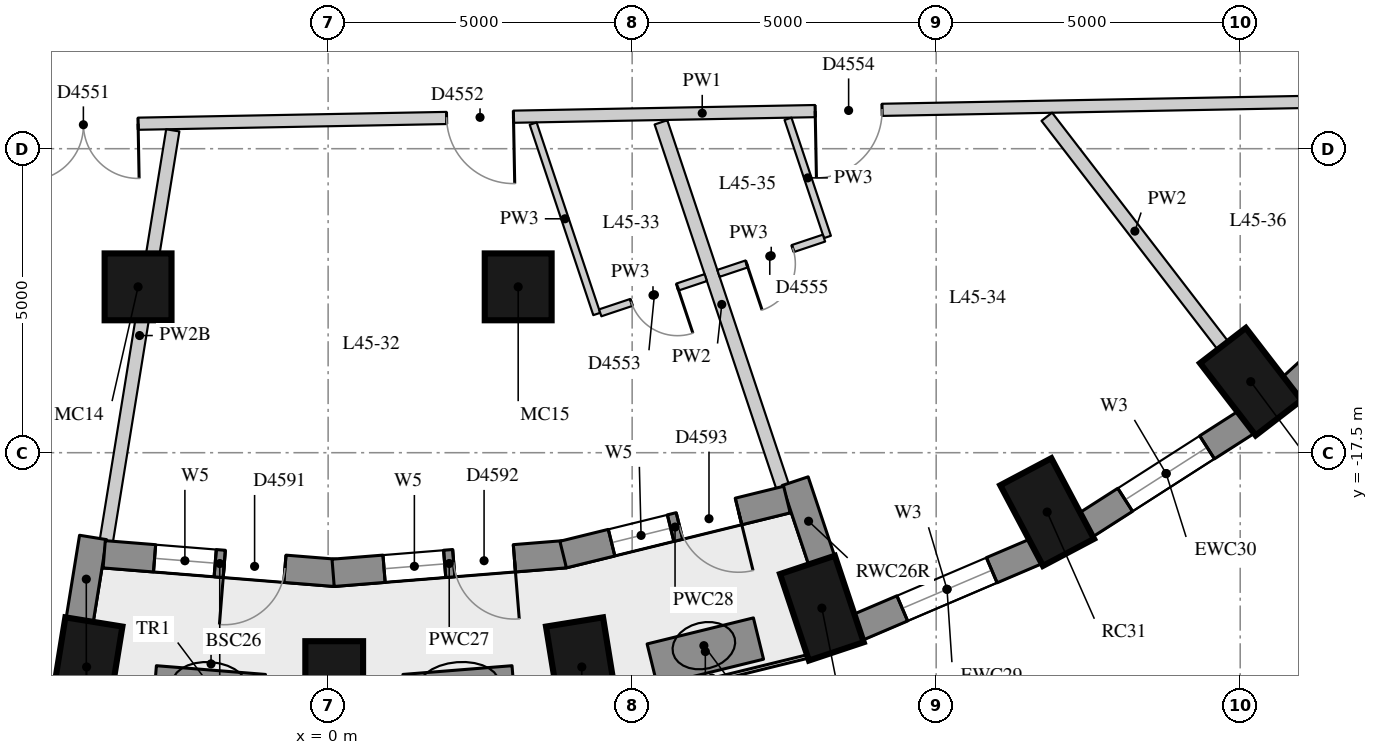
"""IFC4 building model, lengths in metres.
Left out: names, types, materials, properties, quantities, classifications, styles, units other than length and angle.
Written with IfcOpenShell. Run it as: python <this file> out.ifc"""

import sys

from ifc_helpers import new_model, si_unit, direction, frame, frame_2d, origin, origin_2d, place, context, subcontext, project, spatial, rectangle, extrude, element, fill, save


model = new_model("IFC4")
c1 = context("Model", 3, precision=1e-05, world=origin(), true_north=direction((0.0, 1.0)))
c2 = subcontext(c1, "Body", "Model", "MODEL_VIEW")
j1 = project(units=[si_unit("LENGTHUNIT", "METRE"), si_unit("PLANEANGLEUNIT", "RADIAN")], contexts=[c1])
p1 = place(None, origin())
s1 = spatial("IfcSite", under=j1, at=p1, CompositionType="ELEMENT")
p2 = place(p1, origin())
s2 = spatial("IfcBuilding", under=s1, at=p2, CompositionType="ELEMENT")
p3 = place(p2, frame((0.0, 0.0, 161.6)))
s3 = spatial("IfcBuildingStorey", under=s2, at=p3, CompositionType="ELEMENT", Elevation=161.6)
for number, where, z_axis, x_axis in (
    (1, (-3.972, -21.024, 0.0), (0.0, 0.0, 1.0), (-0.16, -0.987, 0.0)),
    (2, (0.1, -21.35, 0.0), (0.0, 0.0, 1.0), (0.0, -1.0, 0.0)),
    (3, (4.172, -21.024, 0.0), (0.0, 0.0, 1.0), (0.16, -0.987, 0.0)),
    (4, (8.12, -20.056, 0.0), (0.0, 0.0, 1.0), (0.317, -0.949, 0.0)),
    (5, (11.825, -18.476, 0.0), (0.0, 0.0, 1.0), (0.468, -0.884, 0.0)),
    (6, (15.173, -16.332, 0.0), (0.0, 0.0, 1.0), (0.61, -0.792, 0.0)),
):
    element("IfcColumn", number, at=place(p3, frame(where, z_axis=z_axis, x_axis=x_axis)), inside=s3, PredefinedType="COLUMN", context=c2, shape_type="SweptSolid", body=[
        extrude(rectangle(XDim=1.5, YDim=0.95, at=origin_2d()), origin(), (0.0, 0.0, 1.0), 3.3),
    ])
for number, where, z_axis, x_axis in (
    (7, (-3.126, -14.772, 0.0), (0.0, 0.0, 1.0), (1.0, 0.0, 0.0)),
    (8, (3.126, -14.772, 0.0), (0.0, 0.0, 1.0), (1.0, 0.0, 0.0)),
):
    element("IfcColumn", number, at=place(p3, frame(where, z_axis=z_axis, x_axis=x_axis)), inside=s3, PredefinedType="COLUMN", context=c2, shape_type="SweptSolid", body=[
        extrude(rectangle(XDim=1.1, YDim=1.1, at=origin_2d()), origin(), (0.0, 0.0, 1.0), 3.3),
    ])
p4 = place(p3, frame((-7.643, -20.662, 0.0), z_axis=(0.0, 0.0, 1.0), x_axis=(0.971232901476, -0.238131583563, 0.0)))
e9 = element("IfcWall", 9, at=p4, inside=s3, PredefinedType="SOLIDWALL", context=c2, shape_type="SweptSolid", body=[
    extrude(rectangle(XDim=3.237, YDim=0.45, at=frame_2d((1.618, 0.0))), origin(), (0.0, 0.0, 1.0), 3.02),
])
p5 = place(p4, frame((0.818, 0.0, 0.4)))
e10 = element("IfcOpeningElement", 10, at=p5, cuts=e9, PredefinedType="OPENING", context=c2, shape_type="SweptSolid", body=[
    extrude(rectangle(XDim=1.6, YDim=1.75, at=frame_2d((0.8, 0.875))), frame((0.0, 0.235, 0.0), z_axis=(0.0, -1.0, 0.0), x_axis=(1.0, 0.0, 0.0)), (0.0, 0.0, 1.0), 0.47),
])
p6 = place(p3, frame((8.706, -20.375, 0.0), z_axis=(0.0, 0.0, 1.0), x_axis=(0.91981046949, 0.392362969986, 0.0)))
e11 = element("IfcWall", 11, at=p6, inside=s3, PredefinedType="SOLIDWALL", context=c2, shape_type="SweptSolid", body=[
    extrude(rectangle(XDim=3.201, YDim=0.45, at=frame_2d((1.6, 0.0))), origin(), (0.0, 0.0, 1.0), 3.02),
])
p7 = place(p6, frame((0.8, 0.0, 0.4)))
e12 = element("IfcOpeningElement", 12, at=p7, cuts=e11, PredefinedType="OPENING", context=c2, shape_type="SweptSolid", body=[
    extrude(rectangle(XDim=1.6, YDim=1.75, at=frame_2d((0.8, 0.875))), frame((0.0, 0.235, 0.0), z_axis=(0.0, -1.0, 0.0), x_axis=(1.0, 0.0, 0.0)), (0.0, 0.0, 1.0), 0.47),
])
p8 = place(p3, frame((12.455, -18.693, 0.0), z_axis=(0.0, 0.0, 1.0), x_axis=(0.842065914439, 0.539374633943, 0.0)))
e13 = element("IfcWall", 13, at=p8, inside=s3, PredefinedType="SOLIDWALL", context=c2, shape_type="SweptSolid", body=[
    extrude(rectangle(XDim=3.151, YDim=0.45, at=frame_2d((1.576, 0.0))), origin(), (0.0, 0.0, 1.0), 3.02),
])
p9 = place(p8, frame((0.776, 0.0, 0.4)))
e14 = element("IfcOpeningElement", 14, at=p9, cuts=e13, PredefinedType="OPENING", context=c2, shape_type="SweptSolid", body=[
    extrude(rectangle(XDim=1.6, YDim=1.75, at=frame_2d((0.8, 0.875))), frame((0.0, 0.235, 0.0), z_axis=(0.0, -1.0, 0.0), x_axis=(1.0, 0.0, 0.0)), (0.0, 0.0, 1.0), 0.47),
])
p10 = place(p3, frame((15.83, -16.439, 0.0), z_axis=(0.0, 0.0, 1.0), x_axis=(0.737808755941, 0.675009807082, 0.0)))
e15 = element("IfcWall", 15, at=p10, inside=s3, PredefinedType="SOLIDWALL", context=c2, shape_type="SweptSolid", body=[
    extrude(rectangle(XDim=3.094, YDim=0.45, at=frame_2d((1.547, 0.0))), origin(), (0.0, 0.0, 1.0), 3.02),
])
p11 = place(p3, frame((-4.088, -20.266, 0.0), z_axis=(0.0, 0.0, 1.0), x_axis=(0.159641024018, 0.98717513312, 0.0)))
e16 = element("IfcWall", 16, at=p11, inside=s3, PredefinedType="SOLIDWALL", context=c2, shape_type="SweptSolid", body=[
    extrude(rectangle(XDim=1.39, YDim=0.45, at=frame_2d((0.695, 0.0))), origin(), (0.0, 0.0, 1.0), 2.57),
])
p12 = place(p3, frame((8.122, -19.286, 0.0), z_axis=(0.0, 0.0, 1.0), x_axis=(-0.316649231286, 0.948542705589, 0.0)))
e17 = element("IfcWall", 17, at=p12, inside=s3, PredefinedType="SOLIDWALL", context=c2, shape_type="SweptSolid", body=[
    extrude(rectangle(XDim=1.39, YDim=0.45, at=frame_2d((0.695, 0.0))), origin(), (0.0, 0.0, 1.0), 3.02),
])
p13 = place(p3, frame((-3.683, -19.171, 0.0), z_axis=(0.0, 0.0, 1.0), x_axis=(0.996792437449, -0.080030223316, 0.0)))
e18 = element("IfcWall", 18, at=p13, inside=s3, PredefinedType="SOLIDWALL", context=c2, shape_type="SweptSolid", body=[
    extrude(rectangle(XDim=3.813, YDim=0.45, at=frame_2d((1.907, 0.0))), origin(), (0.0, 0.0, 1.0), 3.02),
])
p14 = place(p13, frame((0.832, 0.0, 0.4)))
e19 = element("IfcOpeningElement", 19, at=p14, cuts=e18, PredefinedType="OPENING", context=c2, shape_type="SweptSolid", body=[
    extrude(rectangle(XDim=1.0, YDim=1.75, at=frame_2d((0.5, 0.875))), frame((0.0, 0.235, 0.0), z_axis=(0.0, -1.0, 0.0), x_axis=(1.0, 0.0, 0.0)), (0.0, 0.0, 1.0), 0.47),
])
p15 = place(p13, frame((1.982, 0.0, 0.0)))
e20 = element("IfcOpeningElement", 20, at=p15, cuts=e18, PredefinedType="OPENING", context=c2, shape_type="SweptSolid", body=[
    extrude(rectangle(XDim=1.0, YDim=2.15, at=frame_2d((0.5, 1.075))), frame((0.0, 0.235, 0.0), z_axis=(0.0, -1.0, 0.0), x_axis=(1.0, 0.0, 0.0)), (0.0, 0.0, 1.0), 0.47),
])
p16 = place(p3, frame((0.082, -19.476, 0.0), z_axis=(0.0, 0.0, 1.0), x_axis=(0.996792139022, 0.080033940204, 0.0)))
e21 = element("IfcWall", 21, at=p16, inside=s3, PredefinedType="SOLIDWALL", context=c2, shape_type="SweptSolid", body=[
    extrude(rectangle(XDim=3.831, YDim=0.45, at=frame_2d((1.916, 0.0))), origin(), (0.0, 0.0, 1.0), 3.02),
])
p17 = place(p16, frame((0.841, 0.0, 0.4)))
e22 = element("IfcOpeningElement", 22, at=p17, cuts=e21, PredefinedType="OPENING", context=c2, shape_type="SweptSolid", body=[
    extrude(rectangle(XDim=1.0, YDim=1.75, at=frame_2d((0.5, 0.875))), frame((0.0, 0.235, 0.0), z_axis=(0.0, -1.0, 0.0), x_axis=(1.0, 0.0, 0.0)), (0.0, 0.0, 1.0), 0.47),
])
p18 = place(p16, frame((1.991, 0.0, 0.0)))
e23 = element("IfcOpeningElement", 23, at=p18, cuts=e21, PredefinedType="OPENING", context=c2, shape_type="SweptSolid", body=[
    extrude(rectangle(XDim=1.0, YDim=2.15, at=frame_2d((0.5, 1.075))), frame((0.0, 0.235, 0.0), z_axis=(0.0, -1.0, 0.0), x_axis=(1.0, 0.0, 0.0)), (0.0, 0.0, 1.0), 0.47),
])
p19 = place(p3, frame((3.865, -19.175, 0.0), z_axis=(0.0, 0.0, 1.0), x_axis=(0.97109740077, 0.238683552465, 0.0)))
e24 = element("IfcWall", 24, at=p19, inside=s3, PredefinedType="SOLIDWALL", context=c2, shape_type="SweptSolid", body=[
    extrude(rectangle(XDim=3.79, YDim=0.45, at=frame_2d((1.895, 0.0))), origin(), (0.0, 0.0, 1.0), 3.02),
])
p20 = place(p19, frame((0.82, 0.0, 0.4)))
e25 = element("IfcOpeningElement", 25, at=p20, cuts=e24, PredefinedType="OPENING", context=c2, shape_type="SweptSolid", body=[
    extrude(rectangle(XDim=1.0, YDim=1.75, at=frame_2d((0.5, 0.875))), frame((0.0, 0.235, 0.0), z_axis=(0.0, -1.0, 0.0), x_axis=(1.0, 0.0, 0.0)), (0.0, 0.0, 1.0), 0.47),
])
p21 = place(p19, frame((1.97, 0.0, 0.0)))
e26 = element("IfcOpeningElement", 26, at=p21, cuts=e24, PredefinedType="OPENING", context=c2, shape_type="SweptSolid", body=[
    extrude(rectangle(XDim=1.0, YDim=2.15, at=frame_2d((0.5, 1.075))), frame((0.0, 0.235, 0.0), z_axis=(0.0, -1.0, 0.0), x_axis=(1.0, 0.0, 0.0)), (0.0, 0.0, 1.0), 0.47),
])
for number, where, z_axis, x_axis in (
    (27, (-2.852, -21.352, 0.0), (0.0, 0.0, 1.0), (0.997, -0.08, 0.0)),
    (28, (1.258, -21.496, 0.0), (0.0, 0.0, 1.0), (0.997, 0.08, 0.0)),
    (29, (5.329, -20.985, 0.0), (0.0, 0.0, 1.0), (0.971, 0.238, 0.0)),
):
    element("IfcWall", number, at=place(p3, frame(where, z_axis=z_axis, x_axis=x_axis)), inside=s3, PredefinedType="USERDEFINED", context=c2, shape_type="SweptSolid", body=[
        extrude(rectangle(XDim=1.8, YDim=0.7, at=frame_2d((0.9, 0.0))), origin(), (0.0, 0.0, 1.0), 0.75),
    ])
p22 = place(p3, frame((17.6, -11.702, 0.0), z_axis=(0.0, 0.0, 1.0), x_axis=(-0.999825923551, -0.018658043723, 0.0)))
e30 = element("IfcWall", 30, at=p22, inside=s3, PredefinedType="PARTITIONING", context=c2, shape_type="SweptSolid", body=[
    extrude(rectangle(XDim=22.899, YDim=0.2, at=frame_2d((11.449, 0.0))), origin(), (0.0, 0.0, 1.0), 3.02),
])
p23 = place(p22, frame((20.729, 0.0, 0.0)))
e31 = element("IfcOpeningElement", 31, at=p23, cuts=e30, PredefinedType="OPENING", context=c2, shape_type="SweptSolid", body=[
    extrude(rectangle(XDim=1.8, YDim=2.1, at=frame_2d((0.9, 1.05))), frame((0.0, 0.11, 0.0), z_axis=(0.0, -1.0, 0.0), x_axis=(1.0, 0.0, 0.0)), (0.0, 0.0, 1.0), 0.22),
])
p24 = place(p22, frame((14.554, 0.0, 0.0)))
e32 = element("IfcOpeningElement", 32, at=p24, cuts=e30, PredefinedType="OPENING", context=c2, shape_type="SweptSolid", body=[
    extrude(rectangle(XDim=1.1, YDim=2.1, at=frame_2d((0.55, 1.05))), frame((0.0, 0.11, 0.0), z_axis=(0.0, -1.0, 0.0), x_axis=(1.0, 0.0, 0.0)), (0.0, 0.0, 1.0), 0.22),
])
p25 = place(p22, frame((8.491, 0.0, 0.0)))
e33 = element("IfcOpeningElement", 33, at=p25, cuts=e30, PredefinedType="OPENING", context=c2, shape_type="SweptSolid", body=[
    extrude(rectangle(XDim=1.1, YDim=2.1, at=frame_2d((0.55, 1.05))), frame((0.0, 0.11, 0.0), z_axis=(0.0, -1.0, 0.0), x_axis=(1.0, 0.0, 0.0)), (0.0, 0.0, 1.0), 0.22),
])
p26 = place(p3, frame((-3.647, -18.948, 0.0), z_axis=(0.0, 0.0, 1.0), x_axis=(0.159718523375, 0.98716259719, 0.0)))
e34 = element("IfcWall", 34, at=p26, inside=s3, PredefinedType="PARTITIONING", context=c2, shape_type="SweptSolid", body=[
    extrude(rectangle(XDim=6.837, YDim=0.22, at=frame_2d((3.419, 0.0))), origin(), (0.0, 0.0, 1.0), 2.57),
])
p27 = place(p3, frame((7.474, -18.056, 0.0), z_axis=(0.0, 0.0, 1.0), x_axis=(-0.316714858998, 0.948520794759, 0.0)))
e35 = element("IfcWall", 35, at=p27, inside=s3, PredefinedType="PARTITIONING", context=c2, shape_type="SweptSolid", body=[
    extrude(rectangle(XDim=6.315, YDim=0.22, at=frame_2d((3.157, 0.0))), origin(), (0.0, 0.0, 1.0), 3.02),
])
p28 = place(p3, frame((14.716, -15.737, 0.0), z_axis=(0.0, 0.0, 1.0), x_axis=(-0.609964163419, 0.79242899956, 0.0)))
e36 = element("IfcWall", 36, at=p28, inside=s3, PredefinedType="PARTITIONING", context=c2, shape_type="SweptSolid", body=[
    extrude(rectangle(XDim=4.749, YDim=0.22, at=frame_2d((2.374, 0.0))), origin(), (0.0, 0.0, 1.0), 3.02),
])
p29 = place(p3, frame((3.372, -12.087, 0.0), z_axis=(0.0, 0.0, 1.0), x_axis=(0.316715775564, -0.948520488713, 0.0)))
e37 = element("IfcWall", 37, at=p29, inside=s3, PredefinedType="PARTITIONING", context=c2, shape_type="SweptSolid", body=[
    extrude(rectangle(XDim=3.302, YDim=0.12, at=frame_2d((1.651, 0.0))), origin(), (0.0, 0.0, 1.0), 3.02),
])
p30 = place(p3, frame((7.563, -12.009, 0.0), z_axis=(0.0, 0.0, 1.0), x_axis=(0.316763997654, -0.948504385752, 0.0)))
e38 = element("IfcWall", 38, at=p30, inside=s3, PredefinedType="PARTITIONING", context=c2, shape_type="SweptSolid", body=[
    extrude(rectangle(XDim=2.049, YDim=0.12, at=frame_2d((1.024, 0.0))), origin(), (0.0, 0.0, 1.0), 3.02),
])
p31 = place(p3, frame((4.475, -15.199, 0.0), z_axis=(0.0, 0.0, 1.0), x_axis=(0.948549784176, 0.316628026143, 0.0)))
e39 = element("IfcWall", 39, at=p31, inside=s3, PredefinedType="PARTITIONING", context=c2, shape_type="SweptSolid", body=[
    extrude(rectangle(XDim=1.83, YDim=0.12, at=frame_2d((0.915, 0.0))), origin(), (0.0, 0.0, 1.0), 3.02),
])
p32 = place(p31, frame((0.54, 0.0, 0.0)))
e40 = element("IfcOpeningElement", 40, at=p32, cuts=e39, PredefinedType="OPENING", context=c2, shape_type="SweptSolid", body=[
    extrude(rectangle(XDim=0.8, YDim=2.1, at=frame_2d((0.4, 1.05))), frame((0.0, 0.07, 0.0), z_axis=(0.0, -1.0, 0.0), x_axis=(1.0, 0.0, 0.0)), (0.0, 0.0, 1.0), 0.14),
])
p33 = place(p3, frame((8.155, -13.971, 0.0), z_axis=(0.0, 0.0, 1.0), x_axis=(-0.9485230882, -0.31670799035, 0.0)))
e41 = element("IfcWall", 41, at=p33, inside=s3, PredefinedType="PARTITIONING", context=c2, shape_type="SweptSolid", body=[
    extrude(rectangle(XDim=1.83, YDim=0.12, at=frame_2d((0.915, 0.0))), origin(), (0.0, 0.0, 1.0), 3.02),
])
p34 = place(p33, frame((0.54, 0.0, 0.0)))
e42 = element("IfcOpeningElement", 42, at=p34, cuts=e41, PredefinedType="OPENING", context=c2, shape_type="SweptSolid", body=[
    extrude(rectangle(XDim=0.8, YDim=2.1, at=frame_2d((0.4, 1.05))), frame((0.0, 0.07, 0.0), z_axis=(0.0, -1.0, 0.0), x_axis=(1.0, 0.0, 0.0)), (0.0, 0.0, 1.0), 0.14),
])
p35 = place(p7, origin())
e43 = element("IfcWindow", 43, at=p35, inside=s3, PartitioningType="SINGLE_PANEL", PredefinedType="WINDOW", context=c2, shape_type="SweptSolid", body=[
    extrude(rectangle(XDim=1.6, YDim=1.75, at=frame_2d((0.8, 0.875))), frame((0.0, 0.035, 0.0), z_axis=(0.0, -1.0, 0.0), x_axis=(1.0, 0.0, 0.0)), (0.0, 0.0, 1.0), 0.06),
])
fill(e12, e43)
p36 = place(p9, origin())
e44 = element("IfcWindow", 44, at=p36, inside=s3, PartitioningType="SINGLE_PANEL", PredefinedType="WINDOW", context=c2, shape_type="SweptSolid", body=[
    extrude(rectangle(XDim=1.6, YDim=1.75, at=frame_2d((0.8, 0.875))), frame((0.0, 0.035, 0.0), z_axis=(0.0, -1.0, 0.0), x_axis=(1.0, 0.0, 0.0)), (0.0, 0.0, 1.0), 0.06),
])
fill(e14, e44)
p37 = place(p14, origin())
e45 = element("IfcWindow", 45, at=p37, inside=s3, PartitioningType="SINGLE_PANEL", PredefinedType="WINDOW", context=c2, shape_type="SweptSolid", body=[
    extrude(rectangle(XDim=1.0, YDim=1.75, at=frame_2d((0.5, 0.875))), frame((0.0, 0.035, 0.0), z_axis=(0.0, -1.0, 0.0), x_axis=(1.0, 0.0, 0.0)), (0.0, 0.0, 1.0), 0.06),
])
fill(e19, e45)
p38 = place(p15, frame((1.0, 0.0, 0.0), z_axis=(0.0, 0.0, 1.0), x_axis=(-1.0, 0.0, 0.0)))
e46 = element("IfcDoor", 46, at=p38, inside=s3, OperationType="SINGLE_SWING_RIGHT", PredefinedType="DOOR", context=c2, shape_type="SweptSolid", body=[
    extrude(rectangle(XDim=1.0, YDim=2.15, at=frame_2d((0.5, 1.075))), frame((0.0, 0.075, 0.0), z_axis=(0.0, -1.0, 0.0), x_axis=(1.0, 0.0, 0.0)), (0.0, 0.0, 1.0), 0.05),
])
fill(e20, e46)
p39 = place(p17, origin())
e47 = element("IfcWindow", 47, at=p39, inside=s3, PartitioningType="SINGLE_PANEL", PredefinedType="WINDOW", context=c2, shape_type="SweptSolid", body=[
    extrude(rectangle(XDim=1.0, YDim=1.75, at=frame_2d((0.5, 0.875))), frame((0.0, 0.035, 0.0), z_axis=(0.0, -1.0, 0.0), x_axis=(1.0, 0.0, 0.0)), (0.0, 0.0, 1.0), 0.06),
])
fill(e22, e47)
p40 = place(p18, frame((1.0, 0.0, 0.0), z_axis=(0.0, 0.0, 1.0), x_axis=(-1.0, 0.0, 0.0)))
e48 = element("IfcDoor", 48, at=p40, inside=s3, OperationType="SINGLE_SWING_LEFT", PredefinedType="DOOR", context=c2, shape_type="SweptSolid", body=[
    extrude(rectangle(XDim=1.0, YDim=2.15, at=frame_2d((0.5, 1.075))), frame((0.0, 0.075, 0.0), z_axis=(0.0, -1.0, 0.0), x_axis=(1.0, 0.0, 0.0)), (0.0, 0.0, 1.0), 0.05),
])
fill(e23, e48)
p41 = place(p20, origin())
e49 = element("IfcWindow", 49, at=p41, inside=s3, PartitioningType="SINGLE_PANEL", PredefinedType="WINDOW", context=c2, shape_type="SweptSolid", body=[
    extrude(rectangle(XDim=1.0, YDim=1.75, at=frame_2d((0.5, 0.875))), frame((0.0, 0.035, 0.0), z_axis=(0.0, -1.0, 0.0), x_axis=(1.0, 0.0, 0.0)), (0.0, 0.0, 1.0), 0.06),
])
fill(e25, e49)
p42 = place(p21, frame((1.0, 0.0, 0.0), z_axis=(0.0, 0.0, 1.0), x_axis=(-1.0, 0.0, 0.0)))
e50 = element("IfcDoor", 50, at=p42, inside=s3, OperationType="SINGLE_SWING_LEFT", PredefinedType="DOOR", context=c2, shape_type="SweptSolid", body=[
    extrude(rectangle(XDim=1.0, YDim=2.15, at=frame_2d((0.5, 1.075))), frame((0.0, 0.075, 0.0), z_axis=(0.0, -1.0, 0.0), x_axis=(1.0, 0.0, 0.0)), (0.0, 0.0, 1.0), 0.05),
])
fill(e26, e50)
p43 = place(p23, origin())
e51 = element("IfcDoor", 51, at=p43, inside=s3, OperationType="DOUBLE_DOOR_SINGLE_SWING", PredefinedType="DOOR", context=c2, shape_type="SweptSolid", body=[
    extrude(rectangle(XDim=1.8, YDim=2.1, at=frame_2d((0.9, 1.05))), frame((0.0, 0.025, 0.0), z_axis=(0.0, -1.0, 0.0), x_axis=(1.0, 0.0, 0.0)), (0.0, 0.0, 1.0), 0.05),
])
fill(e31, e51)
p44 = place(p24, origin())
e52 = element("IfcDoor", 52, at=p44, inside=s3, OperationType="SINGLE_SWING_LEFT", PredefinedType="DOOR", context=c2, shape_type="SweptSolid", body=[
    extrude(rectangle(XDim=1.1, YDim=2.1, at=frame_2d((0.55, 1.05))), frame((0.0, 0.025, 0.0), z_axis=(0.0, -1.0, 0.0), x_axis=(1.0, 0.0, 0.0)), (0.0, 0.0, 1.0), 0.05),
])
fill(e32, e52)
p45 = place(p32, origin())
e53 = element("IfcDoor", 53, at=p45, inside=s3, OperationType="SINGLE_SWING_LEFT", PredefinedType="DOOR", context=c2, shape_type="SweptSolid", body=[
    extrude(rectangle(XDim=0.8, YDim=2.1, at=frame_2d((0.4, 1.05))), frame((0.0, 0.025, 0.0), z_axis=(0.0, -1.0, 0.0), x_axis=(1.0, 0.0, 0.0)), (0.0, 0.0, 1.0), 0.05),
])
fill(e40, e53)
p46 = place(p25, origin())
e54 = element("IfcDoor", 54, at=p46, inside=s3, OperationType="SINGLE_SWING_RIGHT", PredefinedType="DOOR", context=c2, shape_type="SweptSolid", body=[
    extrude(rectangle(XDim=1.1, YDim=2.1, at=frame_2d((0.55, 1.05))), frame((0.0, 0.025, 0.0), z_axis=(0.0, -1.0, 0.0), x_axis=(1.0, 0.0, 0.0)), (0.0, 0.0, 1.0), 0.05),
])
fill(e33, e54)
p47 = place(p34, origin())
e55 = element("IfcDoor", 55, at=p47, inside=s3, OperationType="SINGLE_SWING_RIGHT", PredefinedType="DOOR", context=c2, shape_type="SweptSolid", body=[
    extrude(rectangle(XDim=0.8, YDim=2.1, at=frame_2d((0.4, 1.05))), frame((0.0, 0.025, 0.0), z_axis=(0.0, -1.0, 0.0), x_axis=(1.0, 0.0, 0.0)), (0.0, 0.0, 1.0), 0.05),
])
fill(e42, e55)
save(model, sys.argv[1])
